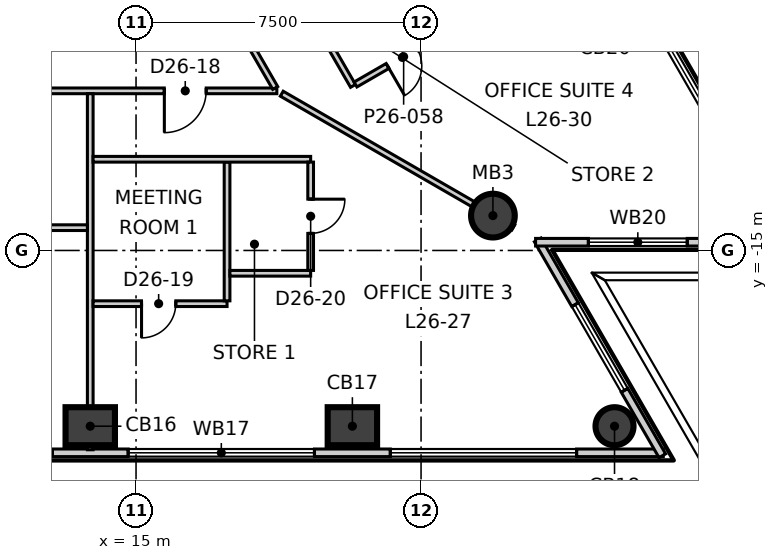
"""IFC4 building model, lengths in metres.
Left out: names, types, materials, properties, quantities, classifications, styles, units other than length and angle.
Written with IfcOpenShell. Run it as: python <this file> out.ifc"""

import sys

from ifc_helpers import new_model, si_unit, direction, frame, frame_2d, origin, origin_2d, place, context, subcontext, project, spatial, rectangle, circle, extrude, element, fill, save


model = new_model("IFC4")
c1 = context("Model", 3, precision=1e-05, world=origin(), true_north=direction((0.0, 1.0)))
c2 = subcontext(c1, "Body", "Model", "MODEL_VIEW")
j1 = project(units=[si_unit("LENGTHUNIT", "METRE"), si_unit("PLANEANGLEUNIT", "RADIAN")], contexts=[c1])
p1 = place(None, origin())
s1 = spatial("IfcSite", under=j1, at=p1, CompositionType="ELEMENT")
p2 = place(p1, origin())
s2 = spatial("IfcBuilding", under=s1, at=p2, CompositionType="ELEMENT")
p3 = place(p2, frame((0.0, 0.0, 116.3)))
s3 = spatial("IfcBuildingStorey", under=s2, at=p3, CompositionType="ELEMENT", Elevation=116.3)
for number, where, z_axis, x_axis in (
    (1, (13.795, -19.624, -0.3), (0.0, 0.0, 1.0), (1.0, 0.0, 0.0)),
    (2, (20.693, -19.624, -0.3), (0.0, 0.0, 1.0), (1.0, 0.0, 0.0)),
):
    element("IfcColumn", number, at=place(p3, frame(where, z_axis=z_axis, x_axis=x_axis)), inside=s3, PredefinedType="COLUMN", context=c2, shape_type="SweptSolid", body=[
        extrude(rectangle(XDim=1.3, YDim=1.0, at=origin_2d()), origin(), (0.0, 0.0, 1.0), 4.0),
    ])
p4 = place(p3, frame((27.591, -19.624, -0.3), z_axis=(0.0, 0.0, 1.0), x_axis=(1.0, 0.0, 0.0)))
e3 = element("IfcColumn", 3, at=p4, inside=s3, PredefinedType="COLUMN", context=c2, shape_type="SweptSolid", body=[
    extrude(circle(Radius=0.5, at=origin_2d()), origin(), (0.0, 0.0, 1.0), 4.0),
])
p5 = place(p3, frame((24.391, -14.083, -0.3), z_axis=(0.0, 0.0, 1.0), x_axis=(1.0, 0.0, 0.0)))
e4 = element("IfcColumn", 4, at=p5, inside=s3, PredefinedType="COLUMN", context=c2, shape_type="SweptSolid", body=[
    extrude(circle(Radius=0.575, at=origin_2d()), origin(), (0.0, 0.0, 1.0), 4.0),
])
p6 = place(p3, frame((-28.894, -20.324, 0.0), z_axis=(0.0, 0.0, 1.0), x_axis=(1.0, 0.0, 0.0)))
e5 = element("IfcWall", 5, at=p6, inside=s3, PredefinedType="ELEMENTEDWALL", context=c2, shape_type="SweptSolid", body=[
    extrude(rectangle(XDim=57.768, YDim=0.2, at=frame_2d((28.884, 0.0))), origin(), (0.0, 0.0, 1.0), 3.7),
])
p7 = place(p6, frame((2.302, 0.0, 0.9)))
e6 = element("IfcOpeningElement", 6, at=p7, cuts=e5, PredefinedType="OPENING", context=c2, shape_type="SweptSolid", body=[
    extrude(rectangle(XDim=4.9, YDim=2.5, at=frame_2d((2.45, 1.25))), frame((0.0, 0.11, 0.0), z_axis=(0.0, -1.0, 0.0), x_axis=(1.0, 0.0, 0.0)), (0.0, 0.0, 1.0), 0.22),
])
p8 = place(p6, frame((9.2, 0.0, 0.9)))
e7 = element("IfcOpeningElement", 7, at=p8, cuts=e5, PredefinedType="OPENING", context=c2, shape_type="SweptSolid", body=[
    extrude(rectangle(XDim=4.9, YDim=2.5, at=frame_2d((2.45, 1.25))), frame((0.0, 0.11, 0.0), z_axis=(0.0, -1.0, 0.0), x_axis=(1.0, 0.0, 0.0)), (0.0, 0.0, 1.0), 0.22),
])
p9 = place(p6, frame((16.097, 0.0, 0.9)))
e8 = element("IfcOpeningElement", 8, at=p9, cuts=e5, PredefinedType="OPENING", context=c2, shape_type="SweptSolid", body=[
    extrude(rectangle(XDim=4.9, YDim=2.5, at=frame_2d((2.45, 1.25))), frame((0.0, 0.11, 0.0), z_axis=(0.0, -1.0, 0.0), x_axis=(1.0, 0.0, 0.0)), (0.0, 0.0, 1.0), 0.22),
])
p10 = place(p6, frame((22.995, 0.0, 0.9)))
e9 = element("IfcOpeningElement", 9, at=p10, cuts=e5, PredefinedType="OPENING", context=c2, shape_type="SweptSolid", body=[
    extrude(rectangle(XDim=4.9, YDim=2.5, at=frame_2d((2.45, 1.25))), frame((0.0, 0.11, 0.0), z_axis=(0.0, -1.0, 0.0), x_axis=(1.0, 0.0, 0.0)), (0.0, 0.0, 1.0), 0.22),
])
p11 = place(p6, frame((29.893, 0.0, 0.9)))
e10 = element("IfcOpeningElement", 10, at=p11, cuts=e5, PredefinedType="OPENING", context=c2, shape_type="SweptSolid", body=[
    extrude(rectangle(XDim=4.9, YDim=2.5, at=frame_2d((2.45, 1.25))), frame((0.0, 0.11, 0.0), z_axis=(0.0, -1.0, 0.0), x_axis=(1.0, 0.0, 0.0)), (0.0, 0.0, 1.0), 0.22),
])
p12 = place(p6, frame((36.791, 0.0, 0.9)))
e11 = element("IfcOpeningElement", 11, at=p12, cuts=e5, PredefinedType="OPENING", context=c2, shape_type="SweptSolid", body=[
    extrude(rectangle(XDim=4.9, YDim=2.5, at=frame_2d((2.45, 1.25))), frame((0.0, 0.11, 0.0), z_axis=(0.0, -1.0, 0.0), x_axis=(1.0, 0.0, 0.0)), (0.0, 0.0, 1.0), 0.22),
])
p13 = place(p6, frame((43.688, 0.0, 0.9)))
e12 = element("IfcOpeningElement", 12, at=p13, cuts=e5, PredefinedType="OPENING", context=c2, shape_type="SweptSolid", body=[
    extrude(rectangle(XDim=4.9, YDim=2.5, at=frame_2d((2.45, 1.25))), frame((0.0, 0.11, 0.0), z_axis=(0.0, -1.0, 0.0), x_axis=(1.0, 0.0, 0.0)), (0.0, 0.0, 1.0), 0.22),
])
p14 = place(p6, frame((50.586, 0.0, 0.9)))
e13 = element("IfcOpeningElement", 13, at=p14, cuts=e5, PredefinedType="OPENING", context=c2, shape_type="SweptSolid", body=[
    extrude(rectangle(XDim=4.9, YDim=2.5, at=frame_2d((2.45, 1.25))), frame((0.0, 0.11, 0.0), z_axis=(0.0, -1.0, 0.0), x_axis=(1.0, 0.0, 0.0)), (0.0, 0.0, 1.0), 0.22),
])
p15 = place(p3, frame((28.849, -20.402, 0.0), z_axis=(0.0, 0.0, 1.0), x_axis=(-0.500066121085, 0.865987225393, 0.0)))
e14 = element("IfcWall", 14, at=p15, inside=s3, PredefinedType="ELEMENTEDWALL", context=c2, shape_type="SweptSolid", body=[
    extrude(rectangle(XDim=6.559, YDim=0.2, at=frame_2d((3.28, 0.0))), origin(), (0.0, 0.0, 1.0), 3.7),
])
p16 = place(p15, frame((1.99, 0.0, 0.9)))
e15 = element("IfcOpeningElement", 15, at=p16, cuts=e14, PredefinedType="OPENING", context=c2, shape_type="SweptSolid", body=[
    extrude(rectangle(XDim=2.6, YDim=2.5, at=frame_2d((1.3, 1.25))), frame((0.0, 0.11, 0.0), z_axis=(0.0, -1.0, 0.0), x_axis=(1.0, 0.0, 0.0)), (0.0, 0.0, 1.0), 0.22),
])
p17 = place(p3, frame((25.514, -14.783, 0.0), z_axis=(0.0, 0.0, 1.0), x_axis=(1.0, 0.0, 0.0)))
e16 = element("IfcWall", 16, at=p17, inside=s3, PredefinedType="ELEMENTEDWALL", context=c2, shape_type="SweptSolid", body=[
    extrude(rectangle(XDim=6.559, YDim=0.2, at=frame_2d((3.28, 0.0))), origin(), (0.0, 0.0, 1.0), 3.7),
])
p18 = place(p17, frame((1.39, 0.0, 0.9)))
e17 = element("IfcOpeningElement", 17, at=p18, cuts=e16, PredefinedType="OPENING", context=c2, shape_type="SweptSolid", body=[
    extrude(rectangle(XDim=2.6, YDim=2.5, at=frame_2d((1.3, 1.25))), frame((0.0, 0.11, 0.0), z_axis=(0.0, -1.0, 0.0), x_axis=(1.0, 0.0, 0.0)), (0.0, 0.0, 1.0), 0.22),
])
p19 = place(p3, frame((32.048, -14.861, 0.0), z_axis=(0.0, 0.0, 1.0), x_axis=(-0.499996704161, 0.866027306629, 0.0)))
e18 = element("IfcWall", 18, at=p19, inside=s3, PredefinedType="ELEMENTEDWALL", context=c2, shape_type="SweptSolid", body=[
    extrude(rectangle(XDim=57.769, YDim=0.2, at=frame_2d((28.884, 0.0))), origin(), (0.0, 0.0, 1.0), 3.7),
])
p20 = place(p19, frame((2.302, 0.0, 0.9)))
e19 = element("IfcOpeningElement", 19, at=p20, cuts=e18, PredefinedType="OPENING", context=c2, shape_type="SweptSolid", body=[
    extrude(rectangle(XDim=4.9, YDim=2.5, at=frame_2d((2.45, 1.25))), frame((0.0, 0.11, 0.0), z_axis=(0.0, -1.0, 0.0), x_axis=(1.0, 0.0, 0.0)), (0.0, 0.0, 1.0), 0.22),
])
p21 = place(p19, frame((9.199, 0.0, 0.9)))
e20 = element("IfcOpeningElement", 20, at=p21, cuts=e18, PredefinedType="OPENING", context=c2, shape_type="SweptSolid", body=[
    extrude(rectangle(XDim=4.9, YDim=2.5, at=frame_2d((2.45, 1.25))), frame((0.0, 0.11, 0.0), z_axis=(0.0, -1.0, 0.0), x_axis=(1.0, 0.0, 0.0)), (0.0, 0.0, 1.0), 0.22),
])
p22 = place(p19, frame((16.097, 0.0, 0.9)))
e21 = element("IfcOpeningElement", 21, at=p22, cuts=e18, PredefinedType="OPENING", context=c2, shape_type="SweptSolid", body=[
    extrude(rectangle(XDim=4.9, YDim=2.5, at=frame_2d((2.45, 1.25))), frame((0.0, 0.11, 0.0), z_axis=(0.0, -1.0, 0.0), x_axis=(1.0, 0.0, 0.0)), (0.0, 0.0, 1.0), 0.22),
])
p23 = place(p19, frame((22.995, 0.0, 0.9)))
e22 = element("IfcOpeningElement", 22, at=p23, cuts=e18, PredefinedType="OPENING", context=c2, shape_type="SweptSolid", body=[
    extrude(rectangle(XDim=4.9, YDim=2.5, at=frame_2d((2.45, 1.25))), frame((0.0, 0.11, 0.0), z_axis=(0.0, -1.0, 0.0), x_axis=(1.0, 0.0, 0.0)), (0.0, 0.0, 1.0), 0.22),
])
p24 = place(p19, frame((29.893, 0.0, 0.9)))
e23 = element("IfcOpeningElement", 23, at=p24, cuts=e18, PredefinedType="OPENING", context=c2, shape_type="SweptSolid", body=[
    extrude(rectangle(XDim=4.9, YDim=2.5, at=frame_2d((2.45, 1.25))), frame((0.0, 0.11, 0.0), z_axis=(0.0, -1.0, 0.0), x_axis=(1.0, 0.0, 0.0)), (0.0, 0.0, 1.0), 0.22),
])
p25 = place(p19, frame((36.791, 0.0, 0.9)))
e24 = element("IfcOpeningElement", 24, at=p25, cuts=e18, PredefinedType="OPENING", context=c2, shape_type="SweptSolid", body=[
    extrude(rectangle(XDim=4.9, YDim=2.5, at=frame_2d((2.45, 1.25))), frame((0.0, 0.11, 0.0), z_axis=(0.0, -1.0, 0.0), x_axis=(1.0, 0.0, 0.0)), (0.0, 0.0, 1.0), 0.22),
])
p26 = place(p19, frame((43.689, 0.0, 0.9)))
e25 = element("IfcOpeningElement", 25, at=p26, cuts=e18, PredefinedType="OPENING", context=c2, shape_type="SweptSolid", body=[
    extrude(rectangle(XDim=4.9, YDim=2.5, at=frame_2d((2.45, 1.25))), frame((0.0, 0.11, 0.0), z_axis=(0.0, -1.0, 0.0), x_axis=(1.0, 0.0, 0.0)), (0.0, 0.0, 1.0), 0.22),
])
p27 = place(p19, frame((50.587, 0.0, 0.9)))
e26 = element("IfcOpeningElement", 26, at=p27, cuts=e18, PredefinedType="OPENING", context=c2, shape_type="SweptSolid", body=[
    extrude(rectangle(XDim=4.9, YDim=2.5, at=frame_2d((2.45, 1.25))), frame((0.0, 0.11, 0.0), z_axis=(0.0, -1.0, 0.0), x_axis=(1.0, 0.0, 0.0)), (0.0, 0.0, 1.0), 0.22),
])
p28 = place(p3, frame((0.901, -10.8, 0.0), z_axis=(0.0, 0.0, 1.0), x_axis=(1.0, 0.0, 0.0)))
e27 = element("IfcWall", 27, at=p28, inside=s3, PredefinedType="PARTITIONING", context=c2, shape_type="SweptSolid", body=[
    extrude(rectangle(XDim=17.804, YDim=0.15, at=frame_2d((8.902, 0.0))), origin(), (0.0, 0.0, 1.0), 3.7),
])
p29 = place(p28, frame((5.849, 0.0, 0.0)))
e28 = element("IfcOpeningElement", 28, at=p29, cuts=e27, PredefinedType="OPENING", context=c2, shape_type="SweptSolid", body=[
    extrude(rectangle(XDim=1.1, YDim=2.1, at=frame_2d((0.55, 1.05))), frame((0.0, 0.085, 0.0), z_axis=(0.0, -1.0, 0.0), x_axis=(1.0, 0.0, 0.0)), (0.0, 0.0, 1.0), 0.17),
])
p30 = place(p28, frame((14.844, 0.0, 0.0)))
e29 = element("IfcOpeningElement", 29, at=p30, cuts=e27, PredefinedType="OPENING", context=c2, shape_type="SweptSolid", body=[
    extrude(rectangle(XDim=1.1, YDim=2.1, at=frame_2d((0.55, 1.05))), frame((0.0, 0.085, 0.0), z_axis=(0.0, -1.0, 0.0), x_axis=(1.0, 0.0, 0.0)), (0.0, 0.0, 1.0), 0.17),
])
p31 = place(p3, frame((9.803, 4.62, 0.0), z_axis=(0.0, 0.0, 1.0), x_axis=(0.500023004316, -0.866012121829, 0.0)))
e30 = element("IfcWall", 30, at=p31, inside=s3, PredefinedType="PARTITIONING", context=c2, shape_type="SweptSolid", body=[
    extrude(rectangle(XDim=17.719, YDim=0.15, at=frame_2d((8.86, 0.0))), origin(), (0.0, 0.0, 1.0), 3.7),
])
p32 = place(p31, frame((14.756, 0.0, 0.0)))
e31 = element("IfcOpeningElement", 31, at=p32, cuts=e30, PredefinedType="OPENING", context=c2, shape_type="SweptSolid", body=[
    extrude(rectangle(XDim=1.1, YDim=2.1, at=frame_2d((0.55, 1.05))), frame((0.0, 0.085, 0.0), z_axis=(0.0, -1.0, 0.0), x_axis=(1.0, 0.0, 0.0)), (0.0, 0.0, 1.0), 0.17),
])
p33 = place(p31, frame((4.645, 0.0, 0.0)))
e32 = element("IfcOpeningElement", 32, at=p33, cuts=e30, PredefinedType="OPENING", context=c2, shape_type="SweptSolid", body=[
    extrude(rectangle(XDim=1.1, YDim=2.1, at=frame_2d((0.55, 1.05))), frame((0.0, 0.085, 0.0), z_axis=(0.0, -1.0, 0.0), x_axis=(1.0, 0.0, 0.0)), (0.0, 0.0, 1.0), 0.17),
])
p34 = place(p31, frame((11.145, 0.0, 0.0)))
e33 = element("IfcOpeningElement", 33, at=p34, cuts=e30, PredefinedType="OPENING", context=c2, shape_type="SweptSolid", body=[
    extrude(rectangle(XDim=0.9, YDim=2.1, at=frame_2d((0.45, 1.05))), frame((0.0, 0.085, 0.0), z_axis=(0.0, -1.0, 0.0), x_axis=(1.0, 0.0, 0.0)), (0.0, 0.0, 1.0), 0.17),
])
p35 = place(p31, frame((8.745, 0.0, 0.0)))
e34 = element("IfcOpeningElement", 34, at=p35, cuts=e30, PredefinedType="OPENING", context=c2, shape_type="SweptSolid", body=[
    extrude(rectangle(XDim=0.9, YDim=2.1, at=frame_2d((0.45, 1.05))), frame((0.0, 0.085, 0.0), z_axis=(0.0, -1.0, 0.0), x_axis=(1.0, 0.0, 0.0)), (0.0, 0.0, 1.0), 0.17),
])
p36 = place(p3, frame((13.795, -20.244, 0.0), z_axis=(0.0, 0.0, 1.0), x_axis=(0.0, 1.0, 0.0)))
e35 = element("IfcWall", 35, at=p36, inside=s3, PredefinedType="PARTITIONING", context=c2, shape_type="SweptSolid", body=[
    extrude(rectangle(XDim=9.369, YDim=0.15, at=frame_2d((4.685, 0.0))), origin(), (0.0, 0.0, 1.0), 3.7),
])
p37 = place(p3, frame((18.835, -10.875, 0.0), z_axis=(0.0, 0.0, 1.0), x_axis=(0.866009336022, -0.500027829149, 0.0)))
e36 = element("IfcWall", 36, at=p37, inside=s3, PredefinedType="PARTITIONING", context=c2, shape_type="SweptSolid", body=[
    extrude(rectangle(XDim=7.036, YDim=0.15, at=frame_2d((3.518, 0.0))), origin(), (0.0, 0.0, 1.0), 3.15),
])
p38 = place(p3, frame((0.975, -14.4, 0.0), z_axis=(0.0, 0.0, 1.0), x_axis=(1.0, 0.0, 0.0)))
e37 = element("IfcWall", 37, at=p38, inside=s3, PredefinedType="PARTITIONING", context=c2, shape_type="SweptSolid", body=[
    extrude(rectangle(XDim=12.745, YDim=0.15, at=frame_2d((6.373, 0.0))), origin(), (0.0, 0.0, 1.0), 3.7),
])
p39 = place(p38, frame((5.875, 0.0, 0.0)))
e38 = element("IfcOpeningElement", 38, at=p39, cuts=e37, PredefinedType="OPENING", context=c2, shape_type="SweptSolid", body=[
    extrude(rectangle(XDim=1.0, YDim=2.1, at=frame_2d((0.5, 1.05))), frame((0.0, 0.085, 0.0), z_axis=(0.0, -1.0, 0.0), x_axis=(1.0, 0.0, 0.0)), (0.0, 0.0, 1.0), 0.17),
])
p40 = place(p3, frame((17.847, -5.712, 0.0), z_axis=(0.0, 0.0, 1.0), x_axis=(0.500069422629, -0.865985318901, 0.0)))
e39 = element("IfcWall", 39, at=p40, inside=s3, PredefinedType="PARTITIONING", context=c2, shape_type="SweptSolid", body=[
    extrude(rectangle(XDim=5.725, YDim=0.15, at=frame_2d((2.863, 0.0))), origin(), (0.0, 0.0, 1.0), 3.7),
])
p41 = place(p40, frame((1.276, 0.0, 0.0)))
e40 = element("IfcOpeningElement", 40, at=p41, cuts=e39, PredefinedType="OPENING", context=c2, shape_type="SweptSolid", body=[
    extrude(rectangle(XDim=0.9, YDim=2.1, at=frame_2d((0.45, 1.05))), frame((0.0, 0.085, 0.0), z_axis=(0.0, -1.0, 0.0), x_axis=(1.0, 0.0, 0.0)), (0.0, 0.0, 1.0), 0.17),
])
p42 = place(p3, frame((13.87, -16.4, 0.0), z_axis=(0.0, 0.0, 1.0), x_axis=(1.0, 0.0, 0.0)))
e41 = element("IfcWall", 41, at=p42, inside=s3, PredefinedType="PARTITIONING", context=c2, shape_type="SweptSolid", body=[
    extrude(rectangle(XDim=3.525, YDim=0.15, at=frame_2d((1.762, 0.0))), origin(), (0.0, 0.0, 1.0), 3.7),
])
p43 = place(p42, frame((1.275, 0.0, 0.0)))
e42 = element("IfcOpeningElement", 42, at=p43, cuts=e41, PredefinedType="OPENING", context=c2, shape_type="SweptSolid", body=[
    extrude(rectangle(XDim=0.9, YDim=2.1, at=frame_2d((0.45, 1.05))), frame((0.0, 0.085, 0.0), z_axis=(0.0, -1.0, 0.0), x_axis=(1.0, 0.0, 0.0)), (0.0, 0.0, 1.0), 0.17),
])
p44 = place(p3, frame((17.395, -16.325, 0.0), z_axis=(0.0, 0.0, 1.0), x_axis=(0.0, 1.0, 0.0)))
e43 = element("IfcWall", 43, at=p44, inside=s3, PredefinedType="PARTITIONING", context=c2, shape_type="SweptSolid", body=[
    extrude(rectangle(XDim=3.65, YDim=0.15, at=frame_2d((1.825, 0.0))), origin(), (0.0, 0.0, 1.0), 3.7),
])
p45 = place(p3, frame((13.87, -12.6, 0.0), z_axis=(0.0, 0.0, 1.0), x_axis=(1.0, 0.0, 0.0)))
e44 = element("IfcWall", 44, at=p45, inside=s3, PredefinedType="PARTITIONING", context=c2, shape_type="SweptSolid", body=[
    extrude(rectangle(XDim=5.725, YDim=0.15, at=frame_2d((2.862, 0.0))), origin(), (0.0, 0.0, 1.0), 3.7),
])
p46 = place(p3, frame((17.47, -15.6, 0.0), z_axis=(0.0, 0.0, 1.0), x_axis=(1.0, 0.0, 0.0)))
e45 = element("IfcWall", 45, at=p46, inside=s3, PredefinedType="PARTITIONING", context=c2, shape_type="SweptSolid", body=[
    extrude(rectangle(XDim=2.125, YDim=0.15, at=frame_2d((1.062, 0.0))), origin(), (0.0, 0.0, 1.0), 3.7),
])
p47 = place(p3, frame((19.595, -15.525, 0.0), z_axis=(0.0, 0.0, 1.0), x_axis=(0.0, 1.0, 0.0)))
e46 = element("IfcWall", 46, at=p47, inside=s3, PredefinedType="PARTITIONING", context=c2, shape_type="SweptSolid", body=[
    extrude(rectangle(XDim=2.85, YDim=0.15, at=frame_2d((1.425, 0.0))), origin(), (0.0, 0.0, 1.0), 3.7),
])
p48 = place(p47, frame((0.975, 0.0, 0.0)))
e47 = element("IfcOpeningElement", 47, at=p48, cuts=e46, PredefinedType="OPENING", context=c2, shape_type="SweptSolid", body=[
    extrude(rectangle(XDim=0.9, YDim=2.1, at=frame_2d((0.45, 1.05))), frame((0.0, 0.085, 0.0), z_axis=(0.0, -1.0, 0.0), x_axis=(1.0, 0.0, 0.0)), (0.0, 0.0, 1.0), 0.17),
])
p49 = place(p3, frame((20.775, -10.633, 0.0), z_axis=(0.0, 0.0, 1.0), x_axis=(0.865938168999, 0.50015106465, 0.0)))
e48 = element("IfcWall", 48, at=p49, inside=s3, PredefinedType="PARTITIONING", context=c2, shape_type="SweptSolid", body=[
    extrude(rectangle(XDim=2.925, YDim=0.15, at=frame_2d((1.463, 0.0))), origin(), (0.0, 0.0, 1.0), 3.7),
])
p50 = place(p49, frame((0.975, 0.0, 0.0)))
e49 = element("IfcOpeningElement", 49, at=p50, cuts=e48, PredefinedType="OPENING", context=c2, shape_type="SweptSolid", body=[
    extrude(rectangle(XDim=0.9, YDim=2.1, at=frame_2d((0.45, 1.05))), frame((0.0, 0.085, 0.0), z_axis=(0.0, -1.0, 0.0), x_axis=(1.0, 0.0, 0.0)), (0.0, 0.0, 1.0), 0.17),
])
p51 = place(p12, origin())
e50 = element("IfcWindow", 50, at=p51, inside=s3, PartitioningType="SINGLE_PANEL", PredefinedType="WINDOW", context=c2, shape_type="SweptSolid", body=[
    extrude(rectangle(XDim=4.9, YDim=2.5, at=frame_2d((2.45, 1.25))), frame((0.0, 0.03, 0.0), z_axis=(0.0, -1.0, 0.0), x_axis=(1.0, 0.0, 0.0)), (0.0, 0.0, 1.0), 0.06),
])
fill(e11, e50)
p52 = place(p13, origin())
e51 = element("IfcWindow", 51, at=p52, inside=s3, PartitioningType="SINGLE_PANEL", PredefinedType="WINDOW", context=c2, shape_type="SweptSolid", body=[
    extrude(rectangle(XDim=4.9, YDim=2.5, at=frame_2d((2.45, 1.25))), frame((0.0, 0.03, 0.0), z_axis=(0.0, -1.0, 0.0), x_axis=(1.0, 0.0, 0.0)), (0.0, 0.0, 1.0), 0.06),
])
fill(e12, e51)
p53 = place(p14, origin())
e52 = element("IfcWindow", 52, at=p53, inside=s3, PartitioningType="SINGLE_PANEL", PredefinedType="WINDOW", context=c2, shape_type="SweptSolid", body=[
    extrude(rectangle(XDim=4.9, YDim=2.5, at=frame_2d((2.45, 1.25))), frame((0.0, 0.03, 0.0), z_axis=(0.0, -1.0, 0.0), x_axis=(1.0, 0.0, 0.0)), (0.0, 0.0, 1.0), 0.06),
])
fill(e13, e52)
p54 = place(p16, origin())
e53 = element("IfcWindow", 53, at=p54, inside=s3, PartitioningType="SINGLE_PANEL", PredefinedType="WINDOW", context=c2, shape_type="SweptSolid", body=[
    extrude(rectangle(XDim=2.6, YDim=2.5, at=frame_2d((1.3, 1.25))), frame((0.0, 0.03, 0.0), z_axis=(0.0, -1.0, 0.0), x_axis=(1.0, 0.0, 0.0)), (0.0, 0.0, 1.0), 0.06),
])
fill(e15, e53)
p55 = place(p18, origin())
e54 = element("IfcWindow", 54, at=p55, inside=s3, PartitioningType="SINGLE_PANEL", PredefinedType="WINDOW", context=c2, shape_type="SweptSolid", body=[
    extrude(rectangle(XDim=2.6, YDim=2.5, at=frame_2d((1.3, 1.25))), frame((0.0, 0.03, 0.0), z_axis=(0.0, -1.0, 0.0), x_axis=(1.0, 0.0, 0.0)), (0.0, 0.0, 1.0), 0.06),
])
fill(e17, e54)
p56 = place(p20, origin())
e55 = element("IfcWindow", 55, at=p56, inside=s3, PartitioningType="SINGLE_PANEL", PredefinedType="WINDOW", context=c2, shape_type="SweptSolid", body=[
    extrude(rectangle(XDim=4.9, YDim=2.5, at=frame_2d((2.45, 1.25))), frame((0.0, 0.03, 0.0), z_axis=(0.0, -1.0, 0.0), x_axis=(1.0, 0.0, 0.0)), (0.0, 0.0, 1.0), 0.06),
])
fill(e19, e55)
p57 = place(p30, origin())
e56 = element("IfcDoor", 56, at=p57, inside=s3, OperationType="SINGLE_SWING_LEFT", PredefinedType="DOOR", context=c2, shape_type="SweptSolid", body=[
    extrude(rectangle(XDim=1.1, YDim=2.1, at=frame_2d((0.55, 1.05))), frame((0.0, 0.025, 0.0), z_axis=(0.0, -1.0, 0.0), x_axis=(1.0, 0.0, 0.0)), (0.0, 0.0, 1.0), 0.05),
])
fill(e29, e56)
p58 = place(p43, origin())
e57 = element("IfcDoor", 57, at=p58, inside=s3, OperationType="SINGLE_SWING_LEFT", PredefinedType="DOOR", context=c2, shape_type="SweptSolid", body=[
    extrude(rectangle(XDim=0.9, YDim=2.1, at=frame_2d((0.45, 1.05))), frame((0.0, 0.025, 0.0), z_axis=(0.0, -1.0, 0.0), x_axis=(1.0, 0.0, 0.0)), (0.0, 0.0, 1.0), 0.05),
])
fill(e42, e57)
p59 = place(p48, origin())
e58 = element("IfcDoor", 58, at=p59, inside=s3, OperationType="SINGLE_SWING_RIGHT", PredefinedType="DOOR", context=c2, shape_type="SweptSolid", body=[
    extrude(rectangle(XDim=0.9, YDim=2.1, at=frame_2d((0.45, 1.05))), frame((0.0, 0.025, 0.0), z_axis=(0.0, -1.0, 0.0), x_axis=(1.0, 0.0, 0.0)), (0.0, 0.0, 1.0), 0.05),
])
fill(e47, e58)
p60 = place(p50, origin())
e59 = element("IfcDoor", 59, at=p60, inside=s3, OperationType="SINGLE_SWING_LEFT", PredefinedType="DOOR", context=c2, shape_type="SweptSolid", body=[
    extrude(rectangle(XDim=0.9, YDim=2.1, at=frame_2d((0.45, 1.05))), frame((0.0, 0.025, 0.0), z_axis=(0.0, -1.0, 0.0), x_axis=(1.0, 0.0, 0.0)), (0.0, 0.0, 1.0), 0.05),
])
fill(e49, e59)
save(model, sys.argv[1])
